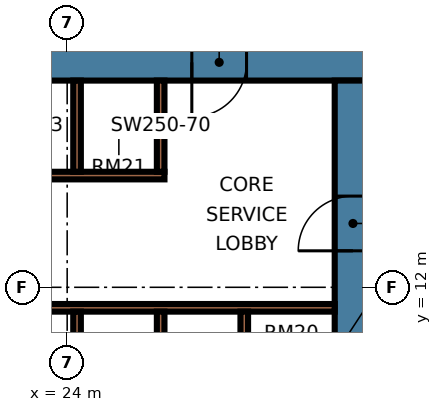
"""IFC4 building model, lengths in metres.
Left out: names, types, materials, properties, quantities, classifications, styles, units other than length and angle.
Written with IfcOpenShell. Run it as: python <this file> out.ifc"""

import sys

from ifc_helpers import new_model, si_unit, direction, frame, frame_2d, origin, place, context, subcontext, project, spatial, rectangle, extrude, element, fill, save


model = new_model("IFC4")
c1 = context("Model", 3, precision=1e-05, world=origin(), true_north=direction((0.0, 1.0)))
c2 = subcontext(c1, "Body", "Model", "MODEL_VIEW")
j1 = project(units=[si_unit("LENGTHUNIT", "METRE"), si_unit("PLANEANGLEUNIT", "RADIAN")], contexts=[c1])
p1 = place(None, origin())
s1 = spatial("IfcSite", under=j1, at=p1, CompositionType="ELEMENT")
p2 = place(p1, origin())
s2 = spatial("IfcBuilding", under=s1, at=p2, CompositionType="ELEMENT")
p3 = place(p2, frame((0.0, 0.0, 7.2)))
s3 = spatial("IfcBuildingStorey", under=s2, at=p3, CompositionType="ELEMENT", Elevation=7.2)
p4 = place(p3, frame((9.0, 19.4, 0.0), z_axis=(0.0, 0.0, 1.0), x_axis=(1.0, 0.0, 0.0)))
e1 = element("IfcWall", 1, at=p4, inside=s3, PredefinedType="SHEAR", context=c2, shape_type="SweptSolid", body=[
    extrude(rectangle(XDim=25.0, YDim=1.2, at=frame_2d((12.5, 0.0))), origin(), (0.0, 0.0, 1.0), 4.8),
])
p5 = place(p4, frame((19.1, 0.0, 0.0)))
e2 = element("IfcOpeningElement", 2, at=p5, cuts=e1, PredefinedType="OPENING", context=c2, shape_type="SweptSolid", body=[
    extrude(rectangle(XDim=1.8, YDim=2.4, at=frame_2d((0.9, 1.2))), frame((0.0, 0.61, 0.0), z_axis=(0.0, -1.0, 0.0), x_axis=(1.0, 0.0, 0.0)), (0.0, 0.0, 1.0), 1.22),
])
p6 = place(p3, frame((33.4, 8.2, 0.0), z_axis=(0.0, 0.0, 1.0), x_axis=(0.0, 1.0, 0.0)))
e3 = element("IfcWall", 3, at=p6, inside=s3, PredefinedType="SHEAR", context=c2, shape_type="SweptSolid", body=[
    extrude(rectangle(XDim=10.6, YDim=1.2, at=frame_2d((5.3, 0.0))), origin(), (0.0, 0.0, 1.0), 4.8),
])
p7 = place(p6, frame((5.0, 0.0, 0.0)))
e4 = element("IfcOpeningElement", 4, at=p7, cuts=e3, PredefinedType="OPENING", context=c2, shape_type="SweptSolid", body=[
    extrude(rectangle(XDim=1.8, YDim=2.4, at=frame_2d((0.9, 1.2))), frame((0.0, 0.61, 0.0), z_axis=(0.0, -1.0, 0.0), x_axis=(1.0, 0.0, 0.0)), (0.0, 0.0, 1.0), 1.22),
])
p8 = place(p3, frame((13.45, 11.325, 0.0), z_axis=(0.0, 0.0, 1.0), x_axis=(1.0, 0.0, 0.0)))
e5 = element("IfcWall", 5, at=p8, inside=s3, PredefinedType="SHEAR", context=c2, shape_type="SweptSolid", body=[
    extrude(rectangle(XDim=19.35, YDim=0.25, at=frame_2d((9.675, 0.0))), origin(), (0.0, 0.0, 1.0), 4.8),
])
p9 = place(p3, frame((13.45, 15.675, 0.0), z_axis=(0.0, 0.0, 1.0), x_axis=(1.0, 0.0, 0.0)))
e6 = element("IfcWall", 6, at=p9, inside=s3, PredefinedType="SHEAR", context=c2, shape_type="SweptSolid", body=[
    extrude(rectangle(XDim=13.75, YDim=0.25, at=frame_2d((6.875, 0.0))), origin(), (0.0, 0.0, 1.0), 4.8),
])
for number, where, z_axis, x_axis in (
    (7, (24.325, 8.2, 0.0), (0.0, 0.0, 1.0), (0.0, 1.0, 0.0)),
    (8, (27.075, 8.2, 0.0), (0.0, 0.0, 1.0), (0.0, 1.0, 0.0)),
    (9, (29.825, 8.2, 0.0), (0.0, 0.0, 1.0), (0.0, 1.0, 0.0)),
    (10, (24.325, 15.8, 0.0), (0.0, 0.0, 1.0), (0.0, 1.0, 0.0)),
    (11, (27.075, 15.8, 0.0), (0.0, 0.0, 1.0), (0.0, 1.0, 0.0)),
):
    element("IfcWall", number, at=place(p3, frame(where, z_axis=z_axis, x_axis=x_axis)), inside=s3, PredefinedType="SHEAR", context=c2, shape_type="SweptSolid", body=[
        extrude(rectangle(XDim=3.0, YDim=0.25, at=frame_2d((1.5, 0.0))), origin(), (0.0, 0.0, 1.0), 4.8),
    ])
p10 = place(p7, origin())
e12 = element("IfcDoor", 12, at=p10, inside=s3, OperationType="DOUBLE_DOOR_SINGLE_SWING", PredefinedType="DOOR", context=c2, shape_type="SweptSolid", body=[
    extrude(rectangle(XDim=1.8, YDim=2.4, at=frame_2d((0.9, 1.2))), frame((0.0, 0.025, 0.0), z_axis=(0.0, -1.0, 0.0), x_axis=(1.0, 0.0, 0.0)), (0.0, 0.0, 1.0), 0.05),
])
fill(e4, e12)
p11 = place(p5, frame((1.8, 0.0, 0.0), z_axis=(0.0, 0.0, 1.0), x_axis=(-1.0, 0.0, 0.0)))
e13 = element("IfcDoor", 13, at=p11, inside=s3, OperationType="DOUBLE_DOOR_SINGLE_SWING", PredefinedType="DOOR", context=c2, shape_type="SweptSolid", body=[
    extrude(rectangle(XDim=1.8, YDim=2.4, at=frame_2d((0.9, 1.2))), frame((0.0, 0.025, 0.0), z_axis=(0.0, -1.0, 0.0), x_axis=(1.0, 0.0, 0.0)), (0.0, 0.0, 1.0), 0.05),
])
fill(e2, e13)
save(model, sys.argv[1])
